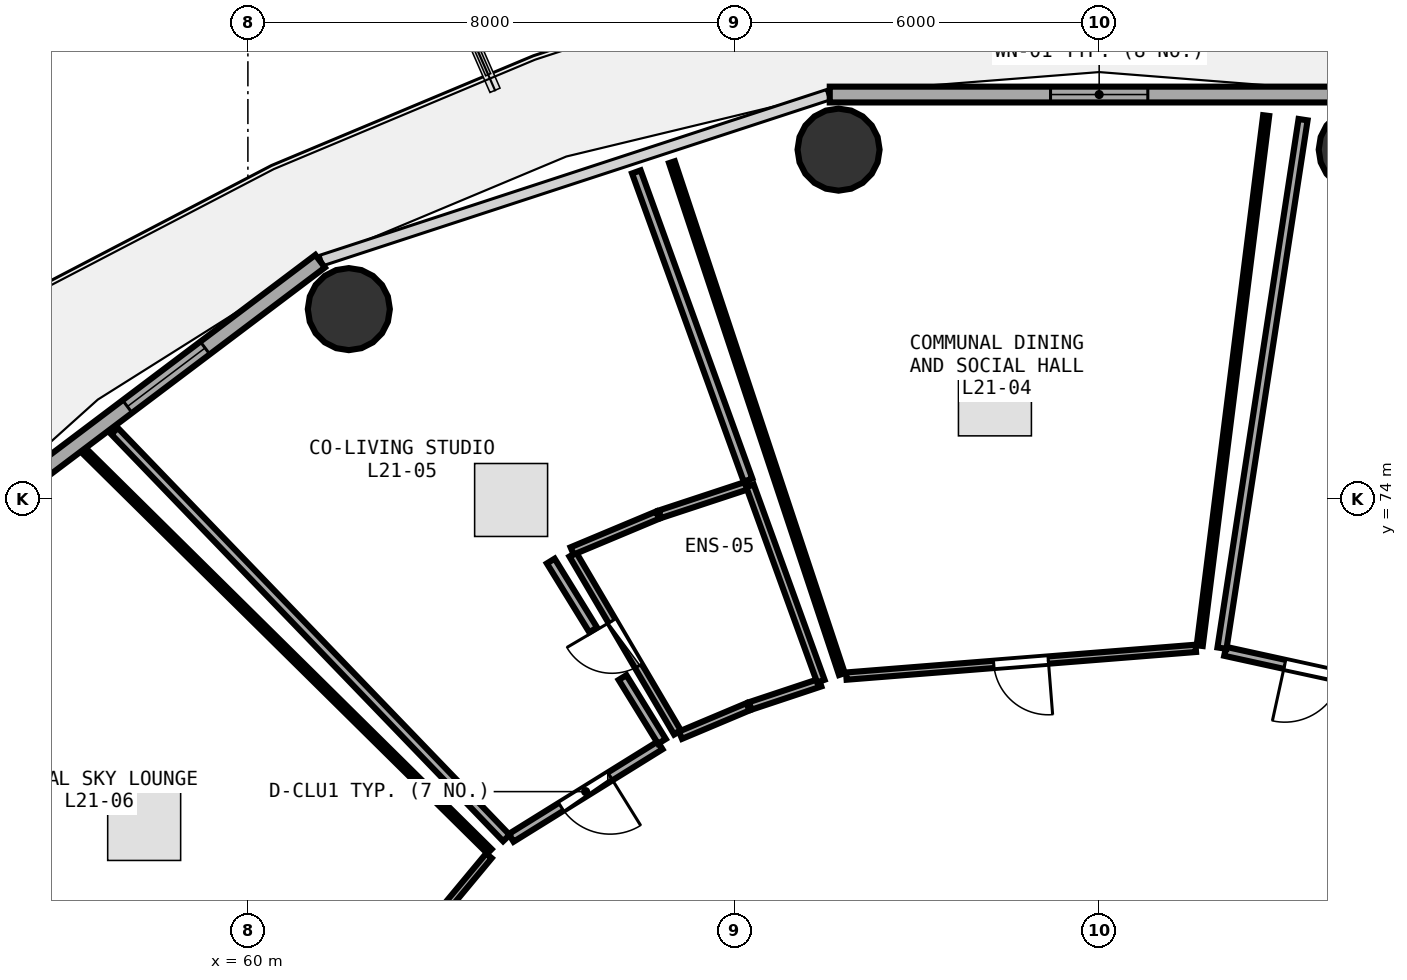
"""IFC4 building model, lengths in metres.
Left out: names, types, materials, properties, quantities, classifications, styles, units other than length and angle.
Written with IfcOpenShell. Run it as: python <this file> out.ifc"""

import sys

from ifc_helpers import new_model, si_unit, direction, frame, frame_2d, origin, origin_2d, place, context, subcontext, project, spatial, rectangle, circle, extrude, element, fill, save


model = new_model("IFC4")
c1 = context("Model", 3, precision=1e-05, world=origin(), true_north=direction((0.0, 1.0)))
c2 = subcontext(c1, "Body", "Model", "MODEL_VIEW")
j1 = project(units=[si_unit("LENGTHUNIT", "METRE"), si_unit("PLANEANGLEUNIT", "RADIAN")], contexts=[c1])
p1 = place(None, origin())
s1 = spatial("IfcSite", under=j1, at=p1, CompositionType="ELEMENT")
p2 = place(p1, origin())
s2 = spatial("IfcBuilding", under=s1, at=p2, CompositionType="ELEMENT")
p3 = place(p2, frame((0.0, 0.0, 83.85)))
s3 = spatial("IfcBuildingStorey", under=s2, at=p3, CompositionType="ELEMENT", Elevation=83.85)
for number, where, z_axis, x_axis in (
    (1, (78.286, 79.745, 0.0), (0.0, 0.0, 1.0), (1.0, 0.0, 0.0)),
    (2, (69.714, 79.745, 0.0), (0.0, 0.0, 1.0), (1.0, 0.0, 0.0)),
    (3, (61.66, 77.122, 0.0), (0.0, 0.0, 1.0), (1.0, 0.0, 0.0)),
):
    element("IfcColumn", number, at=place(p3, frame(where, z_axis=z_axis, x_axis=x_axis)), inside=s3, PredefinedType="COLUMN", context=c2, shape_type="SweptSolid", body=[
        extrude(circle(Radius=0.675, at=origin_2d()), origin(), (0.0, 0.0, 1.0), 3.75),
    ])
p4 = place(p3, frame((78.43, 80.651, 0.0), z_axis=(0.0, 0.0, 1.0), x_axis=(-1.0, 0.0, 0.0)))
e4 = element("IfcWall", 4, at=p4, inside=s3, PredefinedType="SOLIDWALL", context=c2, shape_type="SweptSolid", body=[
    extrude(rectangle(XDim=8.861, YDim=0.26, at=frame_2d((4.43, 0.0))), origin(), (0.0, 0.0, 1.0), 3.475),
])
p5 = place(p4, frame((3.63, 0.0, 0.85)))
e5 = element("IfcOpeningElement", 5, at=p5, cuts=e4, PredefinedType="OPENING", context=c2, shape_type="SweptSolid", body=[
    extrude(rectangle(XDim=1.6, YDim=1.45, at=frame_2d((0.8, 0.725))), frame((0.0, 0.14, 0.0), z_axis=(0.0, -1.0, 0.0), x_axis=(1.0, 0.0, 0.0)), (0.0, 0.0, 1.0), 0.28),
])
p6 = place(p3, frame((61.188, 77.91, 0.0), z_axis=(0.0, 0.0, 1.0), x_axis=(-0.798501507879, -0.601992808857, 0.0)))
e6 = element("IfcWall", 6, at=p6, inside=s3, PredefinedType="SOLIDWALL", context=c2, shape_type="SweptSolid", body=[
    extrude(rectangle(XDim=8.499, YDim=0.26, at=frame_2d((4.25, 0.0))), origin(), (0.0, 0.0, 1.0), 3.475),
])
p7 = place(p6, frame((2.37, 0.0, 0.85)))
e7 = element("IfcOpeningElement", 7, at=p7, cuts=e6, PredefinedType="OPENING", context=c2, shape_type="SweptSolid", body=[
    extrude(rectangle(XDim=1.6, YDim=1.45, at=frame_2d((0.8, 0.725))), frame((0.0, 0.14, 0.0), z_axis=(0.0, -1.0, 0.0), x_axis=(1.0, 0.0, 0.0)), (0.0, 0.0, 1.0), 0.28),
])
p8 = place(p3, frame((78.96, 70.861, 0.0), z_axis=(0.0, 0.0, 1.0), x_axis=(-0.976789452363, 0.214201694093, 0.0)))
e8 = element("IfcWall", 8, at=p8, inside=s3, PredefinedType="PARTITIONING", context=c2, shape_type="SweptSolid", body=[
    extrude(rectangle(XDim=2.957, YDim=0.15, at=frame_2d((1.478, 0.0))), origin(), (0.0, 0.0, 1.0), 3.48),
])
p9 = place(p8, frame((1.003, 0.0, 0.0)))
e9 = element("IfcOpeningElement", 9, at=p9, cuts=e8, PredefinedType="OPENING", context=c2, shape_type="SweptSolid", body=[
    extrude(rectangle(XDim=0.95, YDim=2.08, at=frame_2d((0.475, 1.04))), frame((0.0, 0.085, 0.0), z_axis=(0.0, -1.0, 0.0), x_axis=(1.0, 0.0, 0.0)), (0.0, 0.0, 1.0), 0.17),
])
p10 = place(p3, frame((75.589, 71.543, 0.0), z_axis=(0.0, 0.0, 1.0), x_axis=(-0.996863165686, -0.079144354814, 0.0)))
e10 = element("IfcWall", 10, at=p10, inside=s3, PredefinedType="PARTITIONING", context=c2, shape_type="SweptSolid", body=[
    extrude(rectangle(XDim=5.765, YDim=0.12, at=frame_2d((2.883, 0.0))), origin(), (0.0, 0.0, 1.0), 2.925),
])
p11 = place(p10, frame((2.433, 0.0, 0.0)))
e11 = element("IfcOpeningElement", 11, at=p11, cuts=e10, PredefinedType="OPENING", context=c2, shape_type="SweptSolid", body=[
    extrude(rectangle(XDim=0.9, YDim=2.08, at=frame_2d((0.45, 1.04))), frame((0.0, 0.07, 0.0), z_axis=(0.0, -1.0, 0.0), x_axis=(1.0, 0.0, 0.0)), (0.0, 0.0, 1.0), 0.14),
])
p12 = place(p3, frame((67.066, 70.159, 0.0), z_axis=(0.0, 0.0, 1.0), x_axis=(-0.506831608452, 0.862045080419, 0.0)))
e12 = element("IfcWall", 12, at=p12, inside=s3, PredefinedType="PLUMBINGWALL", context=c2, shape_type="SweptSolid", body=[
    extrude(rectangle(XDim=3.396, YDim=0.13, at=frame_2d((1.698, 0.0))), origin(), (0.0, 0.0, 1.0), 3.175),
])
p13 = place(p12, frame((1.268, 0.0, 0.0)))
e13 = element("IfcOpeningElement", 13, at=p13, cuts=e12, PredefinedType="OPENING", context=c2, shape_type="SweptSolid", body=[
    extrude(rectangle(XDim=0.86, YDim=2.05, at=frame_2d((0.43, 1.025))), frame((0.0, 0.075, 0.0), z_axis=(0.0, -1.0, 0.0), x_axis=(1.0, 0.0, 0.0)), (0.0, 0.0, 1.0), 0.15),
])
p14 = place(p3, frame((66.779, 69.947, 0.0), z_axis=(0.0, 0.0, 1.0), x_axis=(-0.849569495091, -0.527476703761, 0.0)))
e14 = element("IfcWall", 14, at=p14, inside=s3, PredefinedType="PARTITIONING", context=c2, shape_type="SweptSolid", body=[
    extrude(rectangle(XDim=2.883, YDim=0.15, at=frame_2d((1.441, 0.0))), origin(), (0.0, 0.0, 1.0), 2.925),
])
p15 = place(p14, frame((0.966, 0.0, 0.0)))
e15 = element("IfcOpeningElement", 15, at=p15, cuts=e14, PredefinedType="OPENING", context=c2, shape_type="SweptSolid", body=[
    extrude(rectangle(XDim=0.95, YDim=2.08, at=frame_2d((0.475, 1.04))), frame((0.0, 0.085, 0.0), z_axis=(0.0, -1.0, 0.0), x_axis=(1.0, 0.0, 0.0)), (0.0, 0.0, 1.0), 0.17),
])
p16 = place(p3, frame((63.964, 68.131, 0.0), z_axis=(0.0, 0.0, 1.0), x_axis=(-0.639104047727, -0.769120287198, 0.0)))
e16 = element("IfcWall", 16, at=p16, inside=s3, PredefinedType="PARTITIONING", context=c2, shape_type="SweptSolid", body=[
    extrude(rectangle(XDim=5.427, YDim=0.12, at=frame_2d((2.713, 0.0))), origin(), (0.0, 0.0, 1.0), 2.925),
])
p17 = place(p16, frame((2.263, 0.0, 0.0)))
e17 = element("IfcOpeningElement", 17, at=p17, cuts=e16, PredefinedType="OPENING", context=c2, shape_type="SweptSolid", body=[
    extrude(rectangle(XDim=0.9, YDim=2.08, at=frame_2d((0.45, 1.04))), frame((0.0, 0.07, 0.0), z_axis=(0.0, -1.0, 0.0), x_axis=(1.0, 0.0, 0.0)), (0.0, 0.0, 1.0), 0.14),
])
p18 = place(p3, frame((76.02, 71.546, 0.0), z_axis=(0.0, 0.0, 1.0), x_axis=(0.151710828081, 0.988424921096, 0.0)))
e18 = element("IfcWall", 18, at=p18, inside=s3, PredefinedType="PARTITIONING", context=c2, shape_type="SweptSolid", body=[
    extrude(rectangle(XDim=8.793, YDim=0.15, at=frame_2d((4.396, 0.0))), origin(), (0.0, 0.0, 1.0), 2.975),
])
p19 = place(p3, frame((69.769, 71.12, 0.0), z_axis=(0.0, 0.0, 1.0), x_axis=(-0.315178903164, 0.949032275005, 0.0)))
e19 = element("IfcWall", 19, at=p19, inside=s3, PredefinedType="PARTITIONING", context=c2, shape_type="SweptSolid", body=[
    extrude(rectangle(XDim=8.87, YDim=0.1, at=frame_2d((4.435, 0.0))), origin(), (0.0, 0.0, 1.0), 2.975),
])
p20 = place(p3, frame((76.747, 80.304, 0.0), z_axis=(0.0, 0.0, 1.0), x_axis=(-0.124421236745, -0.992229487491, 0.0)))
e20 = element("IfcWall", 20, at=p20, inside=s3, PredefinedType="PARTITIONING", context=c2, shape_type="SweptSolid", body=[
    extrude(rectangle(XDim=8.785, YDim=0.1, at=frame_2d((4.393, 0.0))), origin(), (0.0, 0.0, 1.0), 2.975),
])
p21 = place(p3, frame((69.411, 70.979, 0.0), z_axis=(0.0, 0.0, 1.0), x_axis=(-0.948784055635, -0.315925332592, 0.0)))
e21 = element("IfcWall", 21, at=p21, inside=s3, PredefinedType="PLUMBINGWALL", context=c2, shape_type="SweptSolid", body=[
    extrude(rectangle(XDim=1.211, YDim=0.13, at=frame_2d((0.605, 0.0))), origin(), (0.0, 0.0, 1.0), 3.48),
])
p22 = place(p3, frame((68.225, 70.582, 0.0), z_axis=(0.0, 0.0, 1.0), x_axis=(-0.921601034592, -0.388138548767, 0.0)))
e22 = element("IfcWall", 22, at=p22, inside=s3, PredefinedType="PLUMBINGWALL", context=c2, shape_type="SweptSolid", body=[
    extrude(rectangle(XDim=1.205, YDim=0.13, at=frame_2d((0.602, 0.0))), origin(), (0.0, 0.0, 1.0), 3.235),
])
p23 = place(p3, frame((65.333, 73.146, 0.0), z_axis=(0.0, 0.0, 1.0), x_axis=(0.922426393113, 0.38617295256, 0.0)))
e23 = element("IfcWall", 23, at=p23, inside=s3, PredefinedType="PLUMBINGWALL", context=c2, shape_type="SweptSolid", body=[
    extrude(rectangle(XDim=1.524, YDim=0.13, at=frame_2d((0.762, 0.0))), origin(), (0.0, 0.0, 1.0), 3.48),
])
p24 = place(p3, frame((66.776, 73.748, 0.0), z_axis=(0.0, 0.0, 1.0), x_axis=(0.949634335139, 0.313360223265, 0.0)))
e24 = element("IfcWall", 24, at=p24, inside=s3, PredefinedType="PLUMBINGWALL", context=c2, shape_type="SweptSolid", body=[
    extrude(rectangle(XDim=1.533, YDim=0.13, at=frame_2d((0.767, 0.0))), origin(), (0.0, 0.0, 1.0), 3.48),
])
p25 = place(p3, frame((68.258, 74.216, 0.0), z_axis=(0.0, 0.0, 1.0), x_axis=(0.341002962554, -0.940062221095, 0.0)))
e25 = element("IfcWall", 25, at=p25, inside=s3, PredefinedType="PLUMBINGWALL", context=c2, shape_type="SweptSolid", body=[
    extrude(rectangle(XDim=3.417, YDim=0.13, at=frame_2d((1.708, 0.0))), origin(), (0.0, 0.0, 1.0), 3.175),
])
p26 = place(p3, frame((64.251, 68.424, 0.0), z_axis=(0.0, 0.0, 1.0), x_axis=(-0.693645221886, 0.720316809574, 0.0)))
e26 = element("IfcWall", 26, at=p26, inside=s3, PredefinedType="PARTITIONING", context=c2, shape_type="SweptSolid", body=[
    extrude(rectangle(XDim=9.291, YDim=0.15, at=frame_2d((4.646, 0.0))), origin(), (0.0, 0.0, 1.0), 2.975),
])
p27 = place(p3, frame((66.389, 79.378, 0.0), z_axis=(0.0, 0.0, 1.0), x_axis=(0.340728267281, -0.940161820048, 0.0)))
e27 = element("IfcWall", 27, at=p27, inside=s3, PredefinedType="PARTITIONING", context=c2, shape_type="SweptSolid", body=[
    extrude(rectangle(XDim=5.39, YDim=0.15, at=frame_2d((2.695, 0.0))), origin(), (0.0, 0.0, 1.0), 2.975),
])
p28 = place(p3, frame((64.981, 72.979, 0.0), z_axis=(0.0, 0.0, 1.0), x_axis=(0.524609403226, -0.851343041345, 0.0)))
e28 = element("IfcWall", 28, at=p28, inside=s3, PredefinedType="PARTITIONING", context=c2, shape_type="SweptSolid", body=[
    extrude(rectangle(XDim=1.33, YDim=0.15, at=frame_2d((0.665, 0.0))), origin(), (0.0, 0.0, 1.0), 3.175),
])
p29 = place(p3, frame((66.162, 71.063, 0.0), z_axis=(0.0, 0.0, 1.0), x_axis=(0.52475967521, -0.851250423362, 0.0)))
e29 = element("IfcWall", 29, at=p29, inside=s3, PredefinedType="PARTITIONING", context=c2, shape_type="SweptSolid", body=[
    extrude(rectangle(XDim=1.234, YDim=0.15, at=frame_2d((0.617, 0.0))), origin(), (0.0, 0.0, 1.0), 3.235),
])
p30 = place(p3, frame((60.42, 63.927, 0.0), z_axis=(0.0, 0.0, 1.0), x_axis=(-0.920723225206, 0.390216276654, 0.0)))
e30 = element("IfcWall", 30, at=p30, inside=s3, PredefinedType="PARTITIONING", context=c2, shape_type="SweptSolid", body=[
    extrude(rectangle(XDim=9.756, YDim=0.1, at=frame_2d((4.878, 0.0))), origin(), (0.0, 0.0, 1.0), 2.925),
])
p31 = place(p3, frame((57.344, 74.756, 0.0), z_axis=(0.0, 0.0, 1.0), x_axis=(0.711285789258, -0.702902927864, 0.0)))
e31 = element("IfcWall", 31, at=p31, inside=s3, PredefinedType="PARTITIONING", context=c2, shape_type="SweptSolid", body=[
    extrude(rectangle(XDim=9.32, YDim=0.1, at=frame_2d((4.66, 0.0))), origin(), (0.0, 0.0, 1.0), 2.975),
])
p32 = place(p5, origin())
e32 = element("IfcWindow", 32, at=p32, inside=s3, PartitioningType="SINGLE_PANEL", PredefinedType="WINDOW", context=c2, shape_type="SweptSolid", body=[
    extrude(rectangle(XDim=1.6, YDim=1.45, at=frame_2d((0.8, 0.725))), frame((0.0, 0.03, 0.0), z_axis=(0.0, -1.0, 0.0), x_axis=(1.0, 0.0, 0.0)), (0.0, 0.0, 1.0), 0.06),
])
fill(e5, e32)
p33 = place(p7, origin())
e33 = element("IfcWindow", 33, at=p33, inside=s3, PartitioningType="SINGLE_PANEL", PredefinedType="WINDOW", context=c2, shape_type="SweptSolid", body=[
    extrude(rectangle(XDim=1.6, YDim=1.45, at=frame_2d((0.8, 0.725))), frame((0.0, 0.03, 0.0), z_axis=(0.0, -1.0, 0.0), x_axis=(1.0, 0.0, 0.0)), (0.0, 0.0, 1.0), 0.06),
])
fill(e7, e33)
p34 = place(p9, origin())
e34 = element("IfcDoor", 34, at=p34, inside=s3, OperationType="SINGLE_SWING_RIGHT", PredefinedType="DOOR", context=c2, shape_type="SweptSolid", body=[
    extrude(rectangle(XDim=0.95, YDim=2.08, at=frame_2d((0.475, 1.04))), frame((0.0, 0.025, 0.0), z_axis=(0.0, -1.0, 0.0), x_axis=(1.0, 0.0, 0.0)), (0.0, 0.0, 1.0), 0.05),
])
fill(e9, e34)
p35 = place(p11, origin())
e35 = element("IfcDoor", 35, at=p35, inside=s3, OperationType="SINGLE_SWING_LEFT", PredefinedType="DOOR", context=c2, shape_type="SweptSolid", body=[
    extrude(rectangle(XDim=0.9, YDim=2.08, at=frame_2d((0.45, 1.04))), frame((0.0, 0.025, 0.0), z_axis=(0.0, -1.0, 0.0), x_axis=(1.0, 0.0, 0.0)), (0.0, 0.0, 1.0), 0.05),
])
fill(e11, e35)
p36 = place(p13, origin())
e36 = element("IfcDoor", 36, at=p36, inside=s3, OperationType="SINGLE_SWING_RIGHT", PredefinedType="DOOR", context=c2, shape_type="SweptSolid", body=[
    extrude(rectangle(XDim=0.86, YDim=2.05, at=frame_2d((0.43, 1.025))), frame((0.0, 0.025, 0.0), z_axis=(0.0, -1.0, 0.0), x_axis=(1.0, 0.0, 0.0)), (0.0, 0.0, 1.0), 0.05),
])
fill(e13, e36)
p37 = place(p15, origin())
e37 = element("IfcDoor", 37, at=p37, inside=s3, OperationType="SINGLE_SWING_LEFT", PredefinedType="DOOR", context=c2, shape_type="SweptSolid", body=[
    extrude(rectangle(XDim=0.95, YDim=2.08, at=frame_2d((0.475, 1.04))), frame((0.0, 0.025, 0.0), z_axis=(0.0, -1.0, 0.0), x_axis=(1.0, 0.0, 0.0)), (0.0, 0.0, 1.0), 0.05),
])
fill(e15, e37)
save(model, sys.argv[1])
